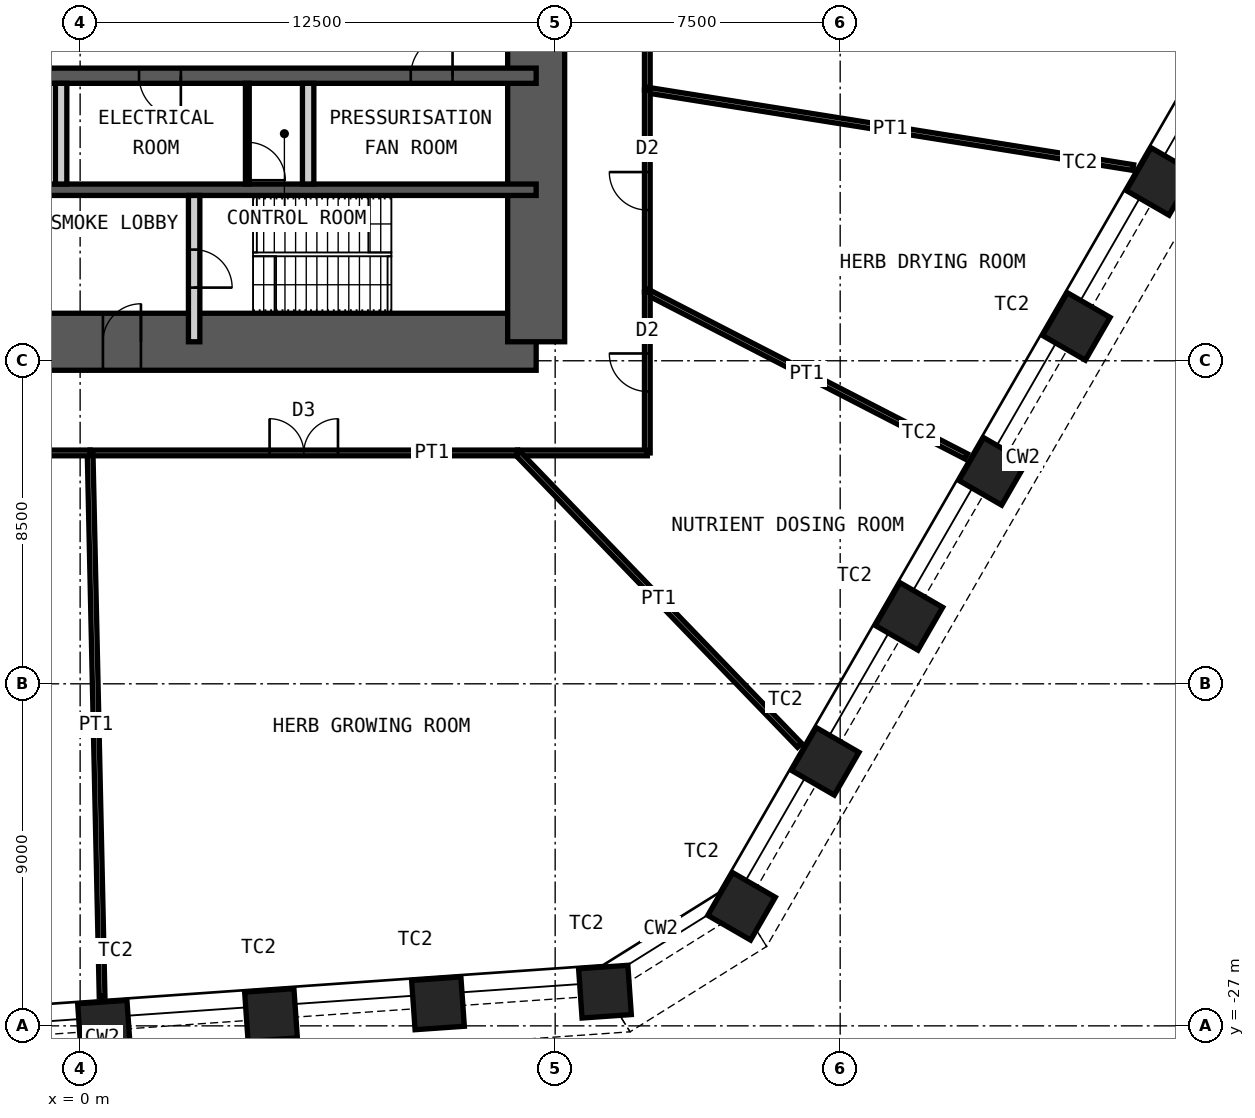
"""IFC4 building model, lengths in metres.
Left out: names, types, materials, properties, quantities, classifications, styles, units other than length and angle.
Written with IfcOpenShell. Run it as: python <this file> out.ifc"""

import sys

from ifc_helpers import new_model, si_unit, direction, frame, frame_2d, origin, origin_2d, place, context, subcontext, project, spatial, rectangle, hollow_rectangle, extrude, element, fill, save


model = new_model("IFC4")
c1 = context("Model", 3, precision=1e-05, world=origin(), true_north=direction((0.0, 1.0)))
c2 = subcontext(c1, "Body", "Model", "MODEL_VIEW")
j1 = project(units=[si_unit("LENGTHUNIT", "METRE"), si_unit("PLANEANGLEUNIT", "RADIAN")], contexts=[c1])
p1 = place(None, origin())
s1 = spatial("IfcSite", under=j1, at=p1, CompositionType="ELEMENT")
p2 = place(p1, origin())
s2 = spatial("IfcBuilding", under=s1, at=p2, CompositionType="ELEMENT")
p3 = place(p2, frame((0.0, 0.0, 57.0)))
s3 = spatial("IfcBuildingStorey", under=s2, at=p3, CompositionType="ELEMENT", Elevation=57.0)
for number, where, z_axis, x_axis in (
    (1, (28.416, -4.782, 0.0), (0.0, 0.0, 1.0), (0.5, 0.866, 0.0)),
    (2, (26.214, -8.596, 0.0), (0.0, 0.0, 1.0), (0.5, 0.866, 0.0)),
    (3, (24.011, -12.411, 0.0), (0.0, 0.0, 1.0), (0.5, 0.866, 0.0)),
    (4, (21.809, -16.225, 0.0), (0.0, 0.0, 1.0), (0.5, 0.866, 0.0)),
    (5, (19.607, -20.04, 0.0), (0.0, 0.0, 1.0), (0.5, 0.866, 0.0)),
    (6, (17.405, -23.854, 0.0), (0.0, 0.0, 1.0), (0.5, 0.866, 0.0)),
    (7, (13.811, -26.1, 0.0), (0.0, 0.0, 1.0), (0.998, 0.07, 0.0)),
    (8, (9.417, -26.407, 0.0), (0.0, 0.0, 1.0), (0.998, 0.07, 0.0)),
    (9, (5.023, -26.715, 0.0), (0.0, 0.0, 1.0), (0.998, 0.07, 0.0)),
    (10, (0.629, -27.022, 0.0), (0.0, 0.0, 1.0), (0.998, 0.07, 0.0)),
):
    element("IfcColumn", number, at=place(p3, frame(where, z_axis=z_axis, x_axis=x_axis)), inside=s3, PredefinedType="COLUMN", context=c2, shape_type="SweptSolid", body=[
        extrude(hollow_rectangle(XDim=1.3, YDim=1.3, WallThickness=0.1, at=origin_2d()), origin(), (0.0, 0.0, 1.0), 5.0),
    ])
p4 = place(p3, frame((-12.0, -9.0, 0.0), z_axis=(0.0, 0.0, 1.0), x_axis=(1.0, 0.0, 0.0)))
e11 = element("IfcWall", 11, at=p4, inside=s3, PredefinedType="SHEAR", context=c2, shape_type="SweptSolid", body=[
    extrude(rectangle(XDim=24.0, YDim=1.5, at=frame_2d((12.0, 0.0))), origin(), (0.0, 0.0, 1.0), 5.0),
])
p5 = place(p4, frame((1.35, 0.0, 0.0)))
e12 = element("IfcOpeningElement", 12, at=p5, cuts=e11, PredefinedType="OPENING", context=c2, shape_type="SweptSolid", body=[
    extrude(rectangle(XDim=1.0, YDim=2.1, at=frame_2d((0.5, 1.05))), frame((0.0, 0.76, 0.0), z_axis=(0.0, -1.0, 0.0), x_axis=(1.0, 0.0, 0.0)), (0.0, 0.0, 1.0), 1.52),
])
p6 = place(p4, frame((5.325, 0.0, 0.0)))
e13 = element("IfcOpeningElement", 13, at=p6, cuts=e11, PredefinedType="OPENING", context=c2, shape_type="SweptSolid", body=[
    extrude(rectangle(XDim=1.15, YDim=2.1, at=frame_2d((0.575, 1.05))), frame((0.0, 0.76, 0.0), z_axis=(0.0, -1.0, 0.0), x_axis=(1.0, 0.0, 0.0)), (0.0, 0.0, 1.0), 1.52),
])
p7 = place(p4, frame((12.6, 0.0, 0.0)))
e14 = element("IfcOpeningElement", 14, at=p7, cuts=e11, PredefinedType="OPENING", context=c2, shape_type="SweptSolid", body=[
    extrude(rectangle(XDim=1.0, YDim=2.1, at=frame_2d((0.5, 1.05))), frame((0.0, 0.76, 0.0), z_axis=(0.0, -1.0, 0.0), x_axis=(1.0, 0.0, 0.0)), (0.0, 0.0, 1.0), 1.52),
])
p8 = place(p3, frame((12.0, -9.0, 0.0), z_axis=(0.0, 0.0, 1.0), x_axis=(0.0, 1.0, 0.0)))
e15 = element("IfcWall", 15, at=p8, inside=s3, PredefinedType="SHEAR", context=c2, shape_type="SweptSolid", body=[
    extrude(rectangle(XDim=18.0, YDim=1.5, at=frame_2d((9.0, 0.0))), origin(), (0.0, 0.0, 1.0), 5.0),
])
p9 = place(p8, frame((8.1, 0.0, 0.0)))
e16 = element("IfcOpeningElement", 16, at=p9, cuts=e15, PredefinedType="OPENING", context=c2, shape_type="SweptSolid", body=[
    extrude(rectangle(XDim=1.8, YDim=2.1, at=frame_2d((0.9, 1.05))), frame((0.0, 0.76, 0.0), z_axis=(0.0, -1.0, 0.0), x_axis=(1.0, 0.0, 0.0)), (0.0, 0.0, 1.0), 1.52),
])
p10 = place(p3, frame((-12.0, -2.0, 0.0), z_axis=(0.0, 0.0, 1.0), x_axis=(1.0, 0.0, 0.0)))
e17 = element("IfcWall", 17, at=p10, inside=s3, PredefinedType="SHEAR", context=c2, shape_type="SweptSolid", body=[
    extrude(rectangle(XDim=24.0, YDim=0.4, at=frame_2d((12.0, 0.0))), origin(), (0.0, 0.0, 1.0), 5.0),
])
p11 = place(p10, frame((1.1, 0.0, 0.0)))
e18 = element("IfcOpeningElement", 18, at=p11, cuts=e17, PredefinedType="OPENING", context=c2, shape_type="SweptSolid", body=[
    extrude(rectangle(XDim=1.1, YDim=2.1, at=frame_2d((0.55, 1.05))), frame((0.0, 0.21, 0.0), z_axis=(0.0, -1.0, 0.0), x_axis=(1.0, 0.0, 0.0)), (0.0, 0.0, 1.0), 0.42),
])
p12 = place(p10, frame((13.55, 0.0, 0.0)))
e19 = element("IfcOpeningElement", 19, at=p12, cuts=e17, PredefinedType="OPENING", context=c2, shape_type="SweptSolid", body=[
    extrude(rectangle(XDim=1.1, YDim=2.1, at=frame_2d((0.55, 1.05))), frame((0.0, 0.21, 0.0), z_axis=(0.0, -1.0, 0.0), x_axis=(1.0, 0.0, 0.0)), (0.0, 0.0, 1.0), 0.42),
])
p13 = place(p10, frame((20.7, 0.0, 0.0)))
e20 = element("IfcOpeningElement", 20, at=p13, cuts=e17, PredefinedType="OPENING", context=c2, shape_type="SweptSolid", body=[
    extrude(rectangle(XDim=1.1, YDim=2.1, at=frame_2d((0.55, 1.05))), frame((0.0, 0.21, 0.0), z_axis=(0.0, -1.0, 0.0), x_axis=(1.0, 0.0, 0.0)), (0.0, 0.0, 1.0), 0.42),
])
p14 = place(p3, frame((-12.0, -5.0, 0.0), z_axis=(0.0, 0.0, 1.0), x_axis=(1.0, 0.0, 0.0)))
e21 = element("IfcWall", 21, at=p14, inside=s3, PredefinedType="SHEAR", context=c2, shape_type="SweptSolid", body=[
    extrude(rectangle(XDim=24.0, YDim=0.3, at=frame_2d((12.0, 0.0))), origin(), (0.0, 0.0, 1.0), 5.0),
])
for number, where, z_axis, x_axis in (
    (22, (-0.5, -4.85, 0.0), (0.0, 0.0, 1.0), (0.0, 1.0, 0.0)),
    (23, (6.0, -4.85, 0.0), (0.0, 0.0, 1.0), (0.0, 1.0, 0.0)),
):
    element("IfcWall", number, at=place(p3, frame(where, z_axis=z_axis, x_axis=x_axis)), inside=s3, PredefinedType="PARTITIONING", context=c2, shape_type="SweptSolid", body=[
        extrude(rectangle(XDim=2.65, YDim=0.3, at=frame_2d((1.325, 0.0))), origin(), (0.0, 0.0, 1.0), 4.78),
    ])
p15 = place(p3, frame((3.0, -9.0, 0.0), z_axis=(0.0, 0.0, 1.0), x_axis=(0.0, 1.0, 0.0)))
e24 = element("IfcWall", 24, at=p15, inside=s3, PredefinedType="PARTITIONING", context=c2, shape_type="SweptSolid", body=[
    extrude(rectangle(XDim=3.85, YDim=0.3, at=frame_2d((1.925, 0.0))), origin(), (0.0, 0.0, 1.0), 4.78),
])
p16 = place(p15, frame((1.425, 0.0, 0.0)))
e25 = element("IfcOpeningElement", 25, at=p16, cuts=e24, PredefinedType="OPENING", context=c2, shape_type="SweptSolid", body=[
    extrude(rectangle(XDim=1.0, YDim=2.1, at=frame_2d((0.5, 1.05))), frame((0.0, 0.16, 0.0), z_axis=(0.0, -1.0, 0.0), x_axis=(1.0, 0.0, 0.0)), (0.0, 0.0, 1.0), 0.32),
])
p17 = place(p3, frame((4.4, -4.85, 0.0), z_axis=(0.0, 0.0, 1.0), x_axis=(0.0, 1.0, 0.0)))
e26 = element("IfcWall", 26, at=p17, inside=s3, PredefinedType="PARTITIONING", context=c2, shape_type="SweptSolid", body=[
    extrude(rectangle(XDim=2.65, YDim=0.1, at=frame_2d((1.325, 0.0))), origin(), (0.0, 0.0, 1.0), 4.78),
])
p18 = place(p17, frame((0.1, 0.0, 0.0)))
e27 = element("IfcOpeningElement", 27, at=p18, cuts=e26, PredefinedType="OPENING", context=c2, shape_type="SweptSolid", body=[
    extrude(rectangle(XDim=1.0, YDim=2.4, at=frame_2d((0.5, 1.2))), frame((0.0, 0.06, 0.0), z_axis=(0.0, -1.0, 0.0), x_axis=(1.0, 0.0, 0.0)), (0.0, 0.0, 1.0), 0.12),
])
p19 = place(p3, frame((14.925, 9.061, 0.0), z_axis=(0.0, 0.0, 1.0), x_axis=(0.0, -1.0, 0.0)))
e28 = element("IfcWall", 28, at=p19, inside=s3, PredefinedType="PARTITIONING", context=c2, shape_type="SweptSolid", body=[
    extrude(rectangle(XDim=11.439, YDim=0.15, at=frame_2d((5.72, 0.0))), origin(), (0.0, 0.0, 1.0), 4.8),
])
p20 = place(p19, frame((4.82, 0.0, 0.0)))
e29 = element("IfcOpeningElement", 29, at=p20, cuts=e28, PredefinedType="OPENING", context=c2, shape_type="SweptSolid", body=[
    extrude(rectangle(XDim=1.8, YDim=2.4, at=frame_2d((0.9, 1.2))), frame((0.0, 0.085, 0.0), z_axis=(0.0, -1.0, 0.0), x_axis=(1.0, 0.0, 0.0)), (0.0, 0.0, 1.0), 0.17),
])
p21 = place(p3, frame((27.711, -4.416, 0.0), z_axis=(0.0, 0.0, 1.0), x_axis=(-0.987539045088, 0.157374186021, 0.0)))
e30 = element("IfcWall", 30, at=p21, inside=s3, PredefinedType="PARTITIONING", context=c2, shape_type="SweptSolid", body=[
    extrude(rectangle(XDim=12.948, YDim=0.15, at=frame_2d((6.474, 0.0))), origin(), (0.0, 0.0, 1.0), 3.7),
])
p22 = place(p3, frame((14.925, -2.378, 0.0), z_axis=(0.0, 0.0, 1.0), x_axis=(0.0, -1.0, 0.0)))
e31 = element("IfcWall", 31, at=p22, inside=s3, PredefinedType="PARTITIONING", context=c2, shape_type="SweptSolid", body=[
    extrude(rectangle(XDim=5.312, YDim=0.15, at=frame_2d((2.656, 0.0))), origin(), (0.0, 0.0, 1.0), 4.8),
])
p23 = place(p22, frame((2.156, 0.0, 0.0)))
e32 = element("IfcOpeningElement", 32, at=p23, cuts=e31, PredefinedType="OPENING", context=c2, shape_type="SweptSolid", body=[
    extrude(rectangle(XDim=1.0, YDim=2.4, at=frame_2d((0.5, 1.2))), frame((0.0, 0.085, 0.0), z_axis=(0.0, -1.0, 0.0), x_axis=(1.0, 0.0, 0.0)), (0.0, 0.0, 1.0), 0.17),
])
p24 = place(p3, frame((23.316, -12.015, 0.0), z_axis=(0.0, 0.0, 1.0), x_axis=(-0.888914247068, 0.458073641851, 0.0)))
e33 = element("IfcWall", 33, at=p24, inside=s3, PredefinedType="PARTITIONING", context=c2, shape_type="SweptSolid", body=[
    extrude(rectangle(XDim=9.44, YDim=0.15, at=frame_2d((4.72, 0.0))), origin(), (0.0, 0.0, 1.0), 3.7),
])
p25 = place(p3, frame((14.925, -7.691, 0.0), z_axis=(0.0, 0.0, 1.0), x_axis=(0.0, -1.0, 0.0)))
e34 = element("IfcWall", 34, at=p25, inside=s3, PredefinedType="PARTITIONING", context=c2, shape_type="SweptSolid", body=[
    extrude(rectangle(XDim=4.234, YDim=0.15, at=frame_2d((2.117, 0.0))), origin(), (0.0, 0.0, 1.0), 4.8),
])
p26 = place(p25, frame((1.617, 0.0, 0.0)))
e35 = element("IfcOpeningElement", 35, at=p26, cuts=e34, PredefinedType="OPENING", context=c2, shape_type="SweptSolid", body=[
    extrude(rectangle(XDim=1.0, YDim=2.4, at=frame_2d((0.5, 1.2))), frame((0.0, 0.085, 0.0), z_axis=(0.0, -1.0, 0.0), x_axis=(1.0, 0.0, 0.0)), (0.0, 0.0, 1.0), 0.17),
])
p27 = place(p3, frame((14.925, -11.925, 0.0), z_axis=(0.0, 0.0, 1.0), x_axis=(-1.0, 0.0, 0.0)))
e36 = element("IfcWall", 36, at=p27, inside=s3, PredefinedType="PARTITIONING", context=c2, shape_type="SweptSolid", body=[
    extrude(rectangle(XDim=3.417, YDim=0.15, at=frame_2d((1.709, 0.0))), origin(), (0.0, 0.0, 1.0), 4.8),
])
p28 = place(p3, frame((18.931, -19.618, 0.0), z_axis=(0.0, 0.0, 1.0), x_axis=(-0.694400087022, 0.719589132175, 0.0)))
e37 = element("IfcWall", 37, at=p28, inside=s3, PredefinedType="PARTITIONING", context=c2, shape_type="SweptSolid", body=[
    extrude(rectangle(XDim=10.691, YDim=0.15, at=frame_2d((5.345, 0.0))), origin(), (0.0, 0.0, 1.0), 3.7),
])
p29 = place(p3, frame((11.508, -11.925, 0.0), z_axis=(0.0, 0.0, 1.0), x_axis=(-1.0, 0.0, 0.0)))
e38 = element("IfcWall", 38, at=p29, inside=s3, PredefinedType="PARTITIONING", context=c2, shape_type="SweptSolid", body=[
    extrude(rectangle(XDim=11.245, YDim=0.15, at=frame_2d((5.623, 0.0))), origin(), (0.0, 0.0, 1.0), 4.8),
])
p30 = place(p29, frame((4.722, 0.0, 0.0)))
e39 = element("IfcOpeningElement", 39, at=p30, cuts=e38, PredefinedType="OPENING", context=c2, shape_type="SweptSolid", body=[
    extrude(rectangle(XDim=1.8, YDim=2.4, at=frame_2d((0.9, 1.2))), frame((0.0, 0.085, 0.0), z_axis=(0.0, -1.0, 0.0), x_axis=(1.0, 0.0, 0.0)), (0.0, 0.0, 1.0), 0.17),
])
p31 = place(p3, frame((0.578, -26.224, 0.0), z_axis=(0.0, 0.0, 1.0), x_axis=(-0.022037776667, 0.999757138709, 0.0)))
e40 = element("IfcWall", 40, at=p31, inside=s3, PredefinedType="PARTITIONING", context=c2, shape_type="SweptSolid", body=[
    extrude(rectangle(XDim=14.302, YDim=0.15, at=frame_2d((7.151, 0.0))), origin(), (0.0, 0.0, 1.0), 3.7),
])
p32 = place(p3, frame((0.263, -11.925, 0.0), z_axis=(0.0, 0.0, 1.0), x_axis=(-1.0, 0.0, 0.0)))
e41 = element("IfcWall", 41, at=p32, inside=s3, PredefinedType="PARTITIONING", context=c2, shape_type="SweptSolid", body=[
    extrude(rectangle(XDim=5.778, YDim=0.15, at=frame_2d((2.889, 0.0))), origin(), (0.0, 0.0, 1.0), 4.8),
])
p33 = place(p32, frame((1.989, 0.0, 0.0)))
e42 = element("IfcOpeningElement", 42, at=p33, cuts=e41, PredefinedType="OPENING", context=c2, shape_type="SweptSolid", body=[
    extrude(rectangle(XDim=1.8, YDim=2.4, at=frame_2d((0.9, 1.2))), frame((0.0, 0.085, 0.0), z_axis=(0.0, -1.0, 0.0), x_axis=(1.0, 0.0, 0.0)), (0.0, 0.0, 1.0), 0.17),
])
p34 = place(p7, origin())
e43 = element("IfcDoor", 43, at=p34, inside=s3, OperationType="SINGLE_SWING_LEFT", PredefinedType="DOOR", context=c2, shape_type="SweptSolid", body=[
    extrude(rectangle(XDim=1.0, YDim=2.1, at=frame_2d((0.5, 1.05))), frame((0.0, 0.025, 0.0), z_axis=(0.0, -1.0, 0.0), x_axis=(1.0, 0.0, 0.0)), (0.0, 0.0, 1.0), 0.05),
])
fill(e14, e43)
p35 = place(p16, origin())
e44 = element("IfcDoor", 44, at=p35, inside=s3, OperationType="SINGLE_SWING_LEFT", PredefinedType="DOOR", context=c2, shape_type="SweptSolid", body=[
    extrude(rectangle(XDim=1.0, YDim=2.1, at=frame_2d((0.5, 1.05))), frame((0.0, 0.025, 0.0), z_axis=(0.0, -1.0, 0.0), x_axis=(1.0, 0.0, 0.0)), (0.0, 0.0, 1.0), 0.05),
])
fill(e25, e44)
p36 = place(p12, origin())
e45 = element("IfcDoor", 45, at=p36, inside=s3, OperationType="SINGLE_SWING_RIGHT", PredefinedType="DOOR", context=c2, shape_type="SweptSolid", body=[
    extrude(rectangle(XDim=1.1, YDim=2.1, at=frame_2d((0.55, 1.05))), frame((0.0, 0.025, 0.0), z_axis=(0.0, -1.0, 0.0), x_axis=(1.0, 0.0, 0.0)), (0.0, 0.0, 1.0), 0.05),
])
fill(e19, e45)
p37 = place(p13, origin())
e46 = element("IfcDoor", 46, at=p37, inside=s3, OperationType="SINGLE_SWING_LEFT", PredefinedType="DOOR", context=c2, shape_type="SweptSolid", body=[
    extrude(rectangle(XDim=1.1, YDim=2.1, at=frame_2d((0.55, 1.05))), frame((0.0, 0.025, 0.0), z_axis=(0.0, -1.0, 0.0), x_axis=(1.0, 0.0, 0.0)), (0.0, 0.0, 1.0), 0.05),
])
fill(e20, e46)
p38 = place(p18, origin())
e47 = element("IfcDoor", 47, at=p38, inside=s3, OperationType="SINGLE_SWING_LEFT", PredefinedType="DOOR", context=c2, shape_type="SweptSolid", body=[
    extrude(rectangle(XDim=1.0, YDim=2.4, at=frame_2d((0.5, 1.2))), frame((0.0, 0.025, 0.0), z_axis=(0.0, -1.0, 0.0), x_axis=(1.0, 0.0, 0.0)), (0.0, 0.0, 1.0), 0.05),
])
fill(e27, e47)
p39 = place(p23, origin())
e48 = element("IfcDoor", 48, at=p39, inside=s3, OperationType="SINGLE_SWING_LEFT", PredefinedType="DOOR", context=c2, shape_type="SweptSolid", body=[
    extrude(rectangle(XDim=1.0, YDim=2.4, at=frame_2d((0.5, 1.2))), frame((0.0, 0.025, 0.0), z_axis=(0.0, -1.0, 0.0), x_axis=(1.0, 0.0, 0.0)), (0.0, 0.0, 1.0), 0.05),
])
fill(e32, e48)
p40 = place(p26, origin())
e49 = element("IfcDoor", 49, at=p40, inside=s3, OperationType="SINGLE_SWING_LEFT", PredefinedType="DOOR", context=c2, shape_type="SweptSolid", body=[
    extrude(rectangle(XDim=1.0, YDim=2.4, at=frame_2d((0.5, 1.2))), frame((0.0, 0.025, 0.0), z_axis=(0.0, -1.0, 0.0), x_axis=(1.0, 0.0, 0.0)), (0.0, 0.0, 1.0), 0.05),
])
fill(e35, e49)
p41 = place(p30, origin())
e50 = element("IfcDoor", 50, at=p41, inside=s3, OperationType="DOUBLE_DOOR_DOUBLE_SWING", PredefinedType="DOOR", context=c2, shape_type="SweptSolid", body=[
    extrude(rectangle(XDim=1.8, YDim=2.4, at=frame_2d((0.9, 1.2))), frame((0.0, 0.025, 0.0), z_axis=(0.0, -1.0, 0.0), x_axis=(1.0, 0.0, 0.0)), (0.0, 0.0, 1.0), 0.05),
])
fill(e39, e50)
save(model, sys.argv[1])
